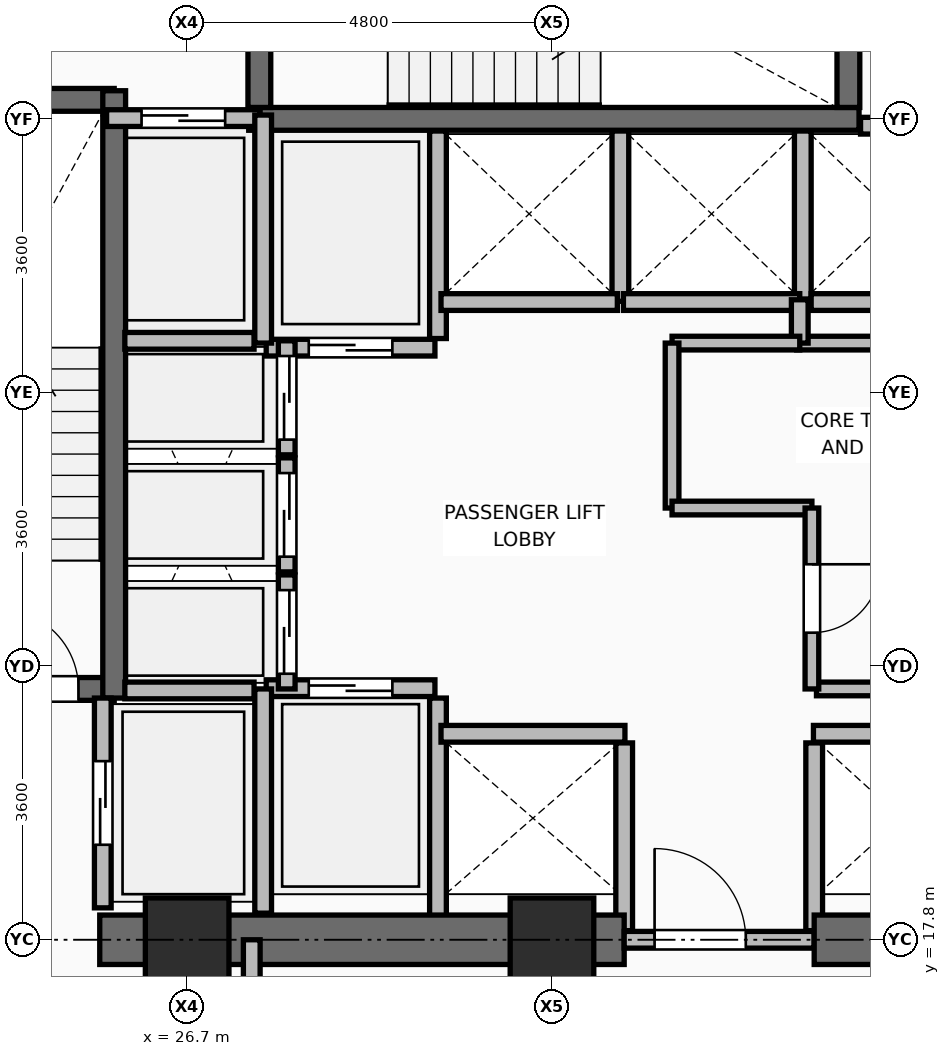
"""IFC4 building model, lengths in metres.
Left out: names, types, materials, properties, quantities, classifications, styles, units other than length and angle.
Written with IfcOpenShell. Run it as: python <this file> out.ifc"""

import sys

from ifc_helpers import new_model, si_unit, direction, frame, frame_2d, origin, origin_2d, place, context, subcontext, project, spatial, rectangle, extrude, element, fill, save


model = new_model("IFC4")
c1 = context("Model", 3, precision=1e-05, world=origin(), true_north=direction((0.0, 1.0)))
c2 = subcontext(c1, "Body", "Model", "MODEL_VIEW")
j1 = project(units=[si_unit("LENGTHUNIT", "METRE"), si_unit("PLANEANGLEUNIT", "RADIAN")], contexts=[c1])
p1 = place(None, origin())
s1 = spatial("IfcSite", under=j1, at=p1, CompositionType="ELEMENT")
p2 = place(p1, origin())
s2 = spatial("IfcBuilding", under=s1, at=p2, CompositionType="ELEMENT")
p3 = place(p2, frame((0.0, 0.0, 53.25)))
s3 = spatial("IfcBuildingStorey", under=s2, at=p3, CompositionType="ELEMENT", Elevation=53.25)
for number, where, z_axis, x_axis in (
    (1, (26.7, 17.8, 0.0), (0.0, 0.0, 1.0), (1.0, 0.0, 0.0)),
    (2, (31.5, 17.8, 0.0), (0.0, 0.0, 1.0), (1.0, 0.0, 0.0)),
):
    element("IfcColumn", number, at=place(p3, frame(where, z_axis=z_axis, x_axis=x_axis)), inside=s3, PredefinedType="COLUMN", context=c2, shape_type="SweptSolid", body=[
        extrude(rectangle(XDim=1.1, YDim=1.1, at=origin_2d()), origin(), (0.0, 0.0, 1.0), 3.75),
    ])
p4 = place(p3, frame((30.0, 18.08, 0.0), z_axis=(0.0, 0.0, 1.0), x_axis=(0.0, 1.0, 0.0)))
e3 = element("IfcWall", 3, at=p4, inside=s3, PredefinedType="PARTITIONING", context=c2, shape_type="SweptSolid", body=[
    extrude(rectangle(XDim=2.9, YDim=0.22, at=frame_2d((1.45, 0.0))), origin(), (0.0, 0.0, 1.0), 3.545),
])
for number, where, z_axis, x_axis in (
    (4, (32.45, 17.92, 0.0), (0.0, 0.0, 1.0), (0.0, 1.0, 0.0)),
    (5, (34.95, 17.92, 0.0), (0.0, 0.0, 1.0), (0.0, 1.0, 0.0)),
):
    element("IfcWall", number, at=place(p3, frame(where, z_axis=z_axis, x_axis=x_axis)), inside=s3, PredefinedType="PARTITIONING", context=c2, shape_type="SweptSolid", body=[
        extrude(rectangle(XDim=2.47, YDim=0.22, at=frame_2d((1.235, 0.0))), origin(), (0.0, 0.0, 1.0), 2.928),
    ])
p5 = place(p3, frame((30.0, 25.71, 0.0), z_axis=(0.0, 0.0, 1.0), x_axis=(0.0, 1.0, 0.0)))
e6 = element("IfcWall", 6, at=p5, inside=s3, PredefinedType="PARTITIONING", context=c2, shape_type="SweptSolid", body=[
    extrude(rectangle(XDim=2.73, YDim=0.22, at=frame_2d((1.365, 0.0))), origin(), (0.0, 0.0, 1.0), 3.545),
])
p6 = place(p3, frame((32.4, 26.2, 0.0), z_axis=(0.0, 0.0, 1.0), x_axis=(0.0, 1.0, 0.0)))
e7 = element("IfcWall", 7, at=p6, inside=s3, PredefinedType="PARTITIONING", context=c2, shape_type="SweptSolid", body=[
    extrude(rectangle(XDim=2.24, YDim=0.22, at=frame_2d((1.12, 0.0))), origin(), (0.0, 0.0, 1.0), 3.545),
])
p7 = place(p3, frame((34.8, 26.23, 0.0), z_axis=(0.0, 0.0, 1.0), x_axis=(0.0, 1.0, 0.0)))
e8 = element("IfcWall", 8, at=p7, inside=s3, PredefinedType="PARTITIONING", context=c2, shape_type="SweptSolid", body=[
    extrude(rectangle(XDim=2.21, YDim=0.22, at=frame_2d((1.105, 0.0))), origin(), (0.0, 0.0, 1.0), 3.545),
])
p8 = place(p3, frame((34.91, 26.19, 0.0), z_axis=(0.0, 0.0, 1.0), x_axis=(1.0, 0.0, 0.0)))
e9 = element("IfcWall", 9, at=p8, inside=s3, PredefinedType="PARTITIONING", context=c2, shape_type="SweptSolid", body=[
    extrude(rectangle(XDim=2.14, YDim=0.22, at=frame_2d((1.07, 0.0))), origin(), (0.0, 0.0, 1.0), 3.545),
])
p9 = place(p3, frame((25.55, 17.8, 0.0), z_axis=(0.0, 0.0, 1.0), x_axis=(1.0, 0.0, 0.0)))
e10 = element("IfcWall", 10, at=p9, inside=s3, PredefinedType="SHEAR", context=c2, shape_type="SweptSolid", body=[
    extrude(rectangle(XDim=6.9, YDim=0.65, at=frame_2d((3.45, 0.0))), origin(), (0.0, 0.0, 1.0), 3.57),
])
p10 = place(p3, frame((32.45, 17.8, 0.0), z_axis=(0.0, 0.0, 1.0), x_axis=(1.0, 0.0, 0.0)))
e11 = element("IfcWall", 11, at=p10, inside=s3, PredefinedType="PARTITIONING", context=c2, shape_type="SweptSolid", body=[
    extrude(rectangle(XDim=2.5, YDim=0.22, at=frame_2d((1.25, 0.0))), origin(), (0.0, 0.0, 1.0), 2.928),
])
p11 = place(p10, frame((0.4, 0.0, 0.0)))
e12 = element("IfcOpeningElement", 12, at=p11, cuts=e11, PredefinedType="OPENING", context=c2, shape_type="SweptSolid", body=[
    extrude(rectangle(XDim=1.2, YDim=2.1, at=frame_2d((0.6, 1.05))), frame((0.0, 0.12, 0.0), z_axis=(0.0, -1.0, 0.0), x_axis=(1.0, 0.0, 0.0)), (0.0, 0.0, 1.0), 0.24),
])
p12 = place(p3, frame((34.95, 17.8, 0.0), z_axis=(0.0, 0.0, 1.0), x_axis=(1.0, 0.0, 0.0)))
e13 = element("IfcWall", 13, at=p12, inside=s3, PredefinedType="SHEAR", context=c2, shape_type="SweptSolid", body=[
    extrude(rectangle(XDim=6.475, YDim=0.65, at=frame_2d((3.238, 0.0))), origin(), (0.0, 0.0, 1.0), 3.57),
])
p13 = place(p3, frame((22.225, 21.1, 0.0), z_axis=(0.0, 0.0, 1.0), x_axis=(1.0, 0.0, 0.0)))
e14 = element("IfcWall", 14, at=p13, inside=s3, PredefinedType="SHEAR", context=c2, shape_type="SweptSolid", body=[
    extrude(rectangle(XDim=3.515, YDim=0.3, at=frame_2d((1.757, 0.0))), origin(), (0.0, 0.0, 1.0), 3.57),
])
p14 = place(p13, frame((1.995, 0.0, 0.0)))
e15 = element("IfcOpeningElement", 15, at=p14, cuts=e14, PredefinedType="OPENING", context=c2, shape_type="SweptSolid", body=[
    extrude(rectangle(XDim=1.05, YDim=2.1, at=frame_2d((0.525, 1.05))), frame((0.0, 0.16, 0.0), z_axis=(0.0, -1.0, 0.0), x_axis=(1.0, 0.0, 0.0)), (0.0, 0.0, 1.0), 0.32),
])
p15 = place(p3, frame((22.225, 28.85, 0.0), z_axis=(0.0, 0.0, 1.0), x_axis=(1.0, 0.0, 0.0)))
e16 = element("IfcWall", 16, at=p15, inside=s3, PredefinedType="SHEAR", context=c2, shape_type="SweptSolid", body=[
    extrude(rectangle(XDim=3.515, YDim=0.3, at=frame_2d((1.757, 0.0))), origin(), (0.0, 0.0, 1.0), 3.57),
])
p16 = place(p3, frame((25.74, 20.98, 0.0), z_axis=(0.0, 0.0, 1.0), x_axis=(0.0, 1.0, 0.0)))
e17 = element("IfcWall", 17, at=p16, inside=s3, PredefinedType="SHEAR", context=c2, shape_type="SweptSolid", body=[
    extrude(rectangle(XDim=7.99, YDim=0.3, at=frame_2d((3.995, 0.0))), origin(), (0.0, 0.0, 1.0), 3.57),
])
p17 = place(p3, frame((27.51, 28.6, 0.0), z_axis=(0.0, 0.0, 1.0), x_axis=(1.0, 0.0, 0.0)))
e18 = element("IfcWall", 18, at=p17, inside=s3, PredefinedType="SHEAR", context=c2, shape_type="SweptSolid", body=[
    extrude(rectangle(XDim=8.03, YDim=0.3, at=frame_2d((4.015, 0.0))), origin(), (0.0, 0.0, 1.0), 3.57),
])
p18 = place(p3, frame((27.65, 28.75, 0.0), z_axis=(0.0, 0.0, 1.0), x_axis=(0.0, 1.0, 0.0)))
e19 = element("IfcWall", 19, at=p18, inside=s3, PredefinedType="SHEAR", context=c2, shape_type="SweptSolid", body=[
    extrude(rectangle(XDim=3.375, YDim=0.3, at=frame_2d((1.688, 0.0))), origin(), (0.0, 0.0, 1.0), 3.57),
])
p19 = place(p18, frame((1.0, 0.0, 0.0)))
e20 = element("IfcOpeningElement", 20, at=p19, cuts=e19, PredefinedType="OPENING", context=c2, shape_type="SweptSolid", body=[
    extrude(rectangle(XDim=1.05, YDim=2.1, at=frame_2d((0.525, 1.05))), frame((0.0, 0.16, 0.0), z_axis=(0.0, -1.0, 0.0), x_axis=(1.0, 0.0, 0.0)), (0.0, 0.0, 1.0), 0.32),
])
p20 = place(p3, frame((35.4, 28.75, 0.0), z_axis=(0.0, 0.0, 1.0), x_axis=(0.0, 1.0, 0.0)))
e21 = element("IfcWall", 21, at=p20, inside=s3, PredefinedType="SHEAR", context=c2, shape_type="SweptSolid", body=[
    extrude(rectangle(XDim=3.375, YDim=0.3, at=frame_2d((1.688, 0.0))), origin(), (0.0, 0.0, 1.0), 3.57),
])
p21 = place(p3, frame((25.59, 18.22, 0.0), z_axis=(0.0, 0.0, 1.0), x_axis=(0.0, 1.0, 0.0)))
e22 = element("IfcWall", 22, at=p21, inside=s3, PredefinedType="PARTITIONING", context=c2, shape_type="SweptSolid", body=[
    extrude(rectangle(XDim=2.76, YDim=0.22, at=frame_2d((1.38, 0.0))), origin(), (0.0, 0.0, 1.0), 3.55),
])
p22 = place(p21, frame((0.83, 0.0, 0.0)))
e23 = element("IfcOpeningElement", 23, at=p22, cuts=e22, PredefinedType="OPENING", context=c2, shape_type="SweptSolid", body=[
    extrude(rectangle(XDim=1.1, YDim=2.2, at=frame_2d((0.55, 1.1))), frame((0.0, 0.12, 0.0), z_axis=(0.0, -1.0, 0.0), x_axis=(1.0, 0.0, 0.0)), (0.0, 0.0, 1.0), 0.24),
])
p23 = place(p3, frame((25.64, 28.61, 0.0), z_axis=(0.0, 0.0, 1.0), x_axis=(1.0, 0.0, 0.0)))
e24 = element("IfcWall", 24, at=p23, inside=s3, PredefinedType="PARTITIONING", context=c2, shape_type="SweptSolid", body=[
    extrude(rectangle(XDim=2.02, YDim=0.22, at=frame_2d((1.01, 0.0))), origin(), (0.0, 0.0, 1.0), 3.55),
])
p24 = place(p23, frame((0.46, 0.0, 0.0)))
e25 = element("IfcOpeningElement", 25, at=p24, cuts=e24, PredefinedType="OPENING", context=c2, shape_type="SweptSolid", body=[
    extrude(rectangle(XDim=1.1, YDim=2.2, at=frame_2d((0.55, 1.1))), frame((0.0, 0.12, 0.0), z_axis=(0.0, -1.0, 0.0), x_axis=(1.0, 0.0, 0.0)), (0.0, 0.0, 1.0), 0.24),
])
p25 = place(p3, frame((27.74, 21.11, 0.0), z_axis=(0.0, 0.0, 1.0), x_axis=(1.0, 0.0, 0.0)))
e26 = element("IfcWall", 26, at=p25, inside=s3, PredefinedType="PARTITIONING", context=c2, shape_type="SweptSolid", body=[
    extrude(rectangle(XDim=2.22, YDim=0.22, at=frame_2d((1.11, 0.0))), origin(), (0.0, 0.0, 1.0), 3.55),
])
p26 = place(p25, frame((0.56, 0.0, 0.0)))
e27 = element("IfcOpeningElement", 27, at=p26, cuts=e26, PredefinedType="OPENING", context=c2, shape_type="SweptSolid", body=[
    extrude(rectangle(XDim=1.1, YDim=2.2, at=frame_2d((0.55, 1.1))), frame((0.0, 0.12, 0.0), z_axis=(0.0, -1.0, 0.0), x_axis=(1.0, 0.0, 0.0)), (0.0, 0.0, 1.0), 0.24),
])
p27 = place(p3, frame((27.74, 25.59, 0.0), z_axis=(0.0, 0.0, 1.0), x_axis=(1.0, 0.0, 0.0)))
e28 = element("IfcWall", 28, at=p27, inside=s3, PredefinedType="PARTITIONING", context=c2, shape_type="SweptSolid", body=[
    extrude(rectangle(XDim=2.22, YDim=0.22, at=frame_2d((1.11, 0.0))), origin(), (0.0, 0.0, 1.0), 3.55),
])
p28 = place(p27, frame((0.56, 0.0, 0.0)))
e29 = element("IfcOpeningElement", 29, at=p28, cuts=e28, PredefinedType="OPENING", context=c2, shape_type="SweptSolid", body=[
    extrude(rectangle(XDim=1.1, YDim=2.2, at=frame_2d((0.55, 1.1))), frame((0.0, 0.12, 0.0), z_axis=(0.0, -1.0, 0.0), x_axis=(1.0, 0.0, 0.0)), (0.0, 0.0, 1.0), 0.24),
])
p29 = place(p3, frame((30.04, 20.51, 0.0), z_axis=(0.0, 0.0, 1.0), x_axis=(1.0, 0.0, 0.0)))
e30 = element("IfcWall", 30, at=p29, inside=s3, PredefinedType="PARTITIONING", context=c2, shape_type="SweptSolid", body=[
    extrude(rectangle(XDim=2.42, YDim=0.22, at=frame_2d((1.21, 0.0))), origin(), (0.0, 0.0, 1.0), 3.55),
])
p30 = place(p3, frame((34.94, 20.51, 0.0), z_axis=(0.0, 0.0, 1.0), x_axis=(1.0, 0.0, 0.0)))
e31 = element("IfcWall", 31, at=p30, inside=s3, PredefinedType="PARTITIONING", context=c2, shape_type="SweptSolid", body=[
    extrude(rectangle(XDim=2.24, YDim=0.22, at=frame_2d((1.12, 0.0))), origin(), (0.0, 0.0, 1.0), 3.55),
])
for number, where, z_axis, x_axis in (
    (32, (30.04, 26.19, 0.0), (0.0, 0.0, 1.0), (1.0, 0.0, 0.0)),
    (33, (32.44, 26.19, 0.0), (0.0, 0.0, 1.0), (1.0, 0.0, 0.0)),
):
    element("IfcWall", number, at=place(p3, frame(where, z_axis=z_axis, x_axis=x_axis)), inside=s3, PredefinedType="PARTITIONING", context=c2, shape_type="SweptSolid", body=[
        extrude(rectangle(XDim=2.32, YDim=0.22, at=frame_2d((1.16, 0.0))), origin(), (0.0, 0.0, 1.0), 3.55),
    ])
p31 = place(p3, frame((35.56, 28.51, 0.0), z_axis=(0.0, 0.0, 1.0), x_axis=(1.0, 0.0, 0.0)))
e34 = element("IfcWall", 34, at=p31, inside=s3, PredefinedType="PARTITIONING", context=c2, shape_type="SweptSolid", body=[
    extrude(rectangle(XDim=1.6, YDim=0.22, at=frame_2d((0.8, 0.0))), origin(), (0.0, 0.0, 1.0), 3.55),
])
p32 = place(p3, frame((28.01, 21.1, 0.0), z_axis=(0.0, 0.0, 1.0), x_axis=(0.0, 1.0, 0.0)))
e35 = element("IfcWall", 35, at=p32, inside=s3, PredefinedType="PARTITIONING", context=c2, shape_type="SweptSolid", body=[
    extrude(rectangle(XDim=1.5, YDim=0.22, at=frame_2d((0.75, 0.0))), origin(), (0.0, 0.0, 1.0), 3.55),
])
p33 = place(p32, frame((0.2, 0.0, 0.0)))
e36 = element("IfcOpeningElement", 36, at=p33, cuts=e35, PredefinedType="OPENING", context=c2, shape_type="SweptSolid", body=[
    extrude(rectangle(XDim=1.1, YDim=2.2, at=frame_2d((0.55, 1.1))), frame((0.0, 0.12, 0.0), z_axis=(0.0, -1.0, 0.0), x_axis=(1.0, 0.0, 0.0)), (0.0, 0.0, 1.0), 0.24),
])
p34 = place(p3, frame((28.01, 22.64, 0.0), z_axis=(0.0, 0.0, 1.0), x_axis=(0.0, 1.0, 0.0)))
e37 = element("IfcWall", 37, at=p34, inside=s3, PredefinedType="PARTITIONING", context=c2, shape_type="SweptSolid", body=[
    extrude(rectangle(XDim=1.5, YDim=0.22, at=frame_2d((0.75, 0.0))), origin(), (0.0, 0.0, 1.0), 3.55),
])
p35 = place(p34, frame((0.2, 0.0, 0.0)))
e38 = element("IfcOpeningElement", 38, at=p35, cuts=e37, PredefinedType="OPENING", context=c2, shape_type="SweptSolid", body=[
    extrude(rectangle(XDim=1.1, YDim=2.2, at=frame_2d((0.55, 1.1))), frame((0.0, 0.12, 0.0), z_axis=(0.0, -1.0, 0.0), x_axis=(1.0, 0.0, 0.0)), (0.0, 0.0, 1.0), 0.24),
])
p36 = place(p3, frame((28.01, 24.18, 0.0), z_axis=(0.0, 0.0, 1.0), x_axis=(0.0, 1.0, 0.0)))
e39 = element("IfcWall", 39, at=p36, inside=s3, PredefinedType="PARTITIONING", context=c2, shape_type="SweptSolid", body=[
    extrude(rectangle(XDim=1.5, YDim=0.22, at=frame_2d((0.75, 0.0))), origin(), (0.0, 0.0, 1.0), 3.55),
])
p37 = place(p36, frame((0.2, 0.0, 0.0)))
e40 = element("IfcOpeningElement", 40, at=p37, cuts=e39, PredefinedType="OPENING", context=c2, shape_type="SweptSolid", body=[
    extrude(rectangle(XDim=1.1, YDim=2.2, at=frame_2d((0.55, 1.1))), frame((0.0, 0.12, 0.0), z_axis=(0.0, -1.0, 0.0), x_axis=(1.0, 0.0, 0.0)), (0.0, 0.0, 1.0), 0.24),
])
p38 = place(p3, frame((27.7, 18.15, 0.0), z_axis=(0.0, 0.0, 1.0), x_axis=(0.0, 1.0, 0.0)))
e41 = element("IfcWall", 41, at=p38, inside=s3, PredefinedType="PARTITIONING", context=c2, shape_type="SweptSolid", body=[
    extrude(rectangle(XDim=2.95, YDim=0.22, at=frame_2d((1.475, 0.0))), origin(), (0.0, 0.0, 1.0), 3.55),
])
p39 = place(p3, frame((27.7, 25.65, 0.0), z_axis=(0.0, 0.0, 1.0), x_axis=(0.0, 1.0, 0.0)))
e42 = element("IfcWall", 42, at=p39, inside=s3, PredefinedType="PARTITIONING", context=c2, shape_type="SweptSolid", body=[
    extrude(rectangle(XDim=3.0, YDim=0.22, at=frame_2d((1.5, 0.0))), origin(), (0.0, 0.0, 1.0), 3.55),
])
for number, where, z_axis, x_axis in (
    (43, (25.88, 21.08, 0.0), (0.0, 0.0, 1.0), (1.0, 0.0, 0.0)),
    (44, (25.88, 25.68, 0.0), (0.0, 0.0, 1.0), (1.0, 0.0, 0.0)),
):
    element("IfcWall", number, at=place(p3, frame(where, z_axis=z_axis, x_axis=x_axis)), inside=s3, PredefinedType="PARTITIONING", context=c2, shape_type="SweptSolid", body=[
        extrude(rectangle(XDim=1.7, YDim=0.22, at=frame_2d((0.85, 0.0))), origin(), (0.0, 0.0, 1.0), 3.55),
    ])
p40 = place(p3, frame((34.98, 21.1, 0.0), z_axis=(0.0, 0.0, 1.0), x_axis=(1.0, 0.0, 0.0)))
e45 = element("IfcWall", 45, at=p40, inside=s3, PredefinedType="PARTITIONING", context=c2, shape_type="SweptSolid", body=[
    extrude(rectangle(XDim=2.08, YDim=0.18, at=frame_2d((1.04, 0.0))), origin(), (0.0, 0.0, 1.0), 3.55),
])
p41 = place(p3, frame((34.72, 25.65, 0.0), z_axis=(0.0, 0.0, 1.0), x_axis=(1.0, 0.0, 0.0)))
e46 = element("IfcWall", 46, at=p41, inside=s3, PredefinedType="PARTITIONING", context=c2, shape_type="SweptSolid", body=[
    extrude(rectangle(XDim=2.34, YDim=0.18, at=frame_2d((1.17, 0.0))), origin(), (0.0, 0.0, 1.0), 3.55),
])
p42 = place(p3, frame((34.76, 25.65, 0.0), z_axis=(0.0, 0.0, 1.0), x_axis=(0.0, 1.0, 0.0)))
e47 = element("IfcWall", 47, at=p42, inside=s3, PredefinedType="PARTITIONING", context=c2, shape_type="SweptSolid", body=[
    extrude(rectangle(XDim=0.57, YDim=0.22, at=frame_2d((0.285, 0.0))), origin(), (0.0, 0.0, 1.0), 3.55),
])
p43 = place(p3, frame((33.08, 25.65, 0.0), z_axis=(0.0, 0.0, 1.0), x_axis=(1.0, 0.0, 0.0)))
e48 = element("IfcWall", 48, at=p43, inside=s3, PredefinedType="PARTITIONING", context=c2, shape_type="SweptSolid", body=[
    extrude(rectangle(XDim=1.68, YDim=0.18, at=frame_2d((0.84, 0.0))), origin(), (0.0, 0.0, 1.0), 3.55),
])
p44 = place(p3, frame((33.08, 23.48, 0.0), z_axis=(0.0, 0.0, 1.0), x_axis=(0.0, 1.0, 0.0)))
e49 = element("IfcWall", 49, at=p44, inside=s3, PredefinedType="PARTITIONING", context=c2, shape_type="SweptSolid", body=[
    extrude(rectangle(XDim=2.17, YDim=0.18, at=frame_2d((1.085, 0.0))), origin(), (0.0, 0.0, 1.0), 3.55),
])
p45 = place(p3, frame((33.08, 23.48, 0.0), z_axis=(0.0, 0.0, 1.0), x_axis=(1.0, 0.0, 0.0)))
e50 = element("IfcWall", 50, at=p45, inside=s3, PredefinedType="PARTITIONING", context=c2, shape_type="SweptSolid", body=[
    extrude(rectangle(XDim=1.84, YDim=0.18, at=frame_2d((0.92, 0.0))), origin(), (0.0, 0.0, 1.0), 3.55),
])
p46 = place(p3, frame((34.92, 21.1, 0.0), z_axis=(0.0, 0.0, 1.0), x_axis=(0.0, 1.0, 0.0)))
e51 = element("IfcWall", 51, at=p46, inside=s3, PredefinedType="PARTITIONING", context=c2, shape_type="SweptSolid", body=[
    extrude(rectangle(XDim=2.38, YDim=0.18, at=frame_2d((1.19, 0.0))), origin(), (0.0, 0.0, 1.0), 3.55),
])
p47 = place(p46, frame((0.74, 0.0, 0.0)))
e52 = element("IfcOpeningElement", 52, at=p47, cuts=e51, PredefinedType="OPENING", context=c2, shape_type="SweptSolid", body=[
    extrude(rectangle(XDim=0.9, YDim=2.1, at=frame_2d((0.45, 1.05))), frame((0.0, 0.1, 0.0), z_axis=(0.0, -1.0, 0.0), x_axis=(1.0, 0.0, 0.0)), (0.0, 0.0, 1.0), 0.2),
])
p48 = place(p3, frame((27.55, 14.35, 0.0), z_axis=(0.0, 0.0, 1.0), x_axis=(0.0, 1.0, 0.0)))
e53 = element("IfcWall", 53, at=p48, inside=s3, PredefinedType="PARTITIONING", context=c2, shape_type="SweptSolid", body=[
    extrude(rectangle(XDim=3.45, YDim=0.22, at=frame_2d((1.725, 0.0))), origin(), (0.0, 0.0, 1.0), 2.928),
])
p49 = place(p48, frame((1.175, 0.0, 0.0)))
e54 = element("IfcOpeningElement", 54, at=p49, cuts=e53, PredefinedType="OPENING", context=c2, shape_type="SweptSolid", body=[
    extrude(rectangle(XDim=1.1, YDim=2.1, at=frame_2d((0.55, 1.05))), frame((0.0, 0.12, 0.0), z_axis=(0.0, -1.0, 0.0), x_axis=(1.0, 0.0, 0.0)), (0.0, 0.0, 1.0), 0.24),
])
p50 = place(p11, origin())
e55 = element("IfcDoor", 55, at=p50, inside=s3, OperationType="SINGLE_SWING_LEFT", PredefinedType="DOOR", context=c2, shape_type="SweptSolid", body=[
    extrude(rectangle(XDim=1.2, YDim=2.1, at=frame_2d((0.6, 1.05))), frame((0.0, 0.025, 0.0), z_axis=(0.0, -1.0, 0.0), x_axis=(1.0, 0.0, 0.0)), (0.0, 0.0, 1.0), 0.05),
])
fill(e12, e55)
p51 = place(p14, origin())
e56 = element("IfcDoor", 56, at=p51, inside=s3, OperationType="SINGLE_SWING_LEFT", PredefinedType="DOOR", context=c2, shape_type="SweptSolid", body=[
    extrude(rectangle(XDim=1.05, YDim=2.1, at=frame_2d((0.525, 1.05))), frame((0.0, 0.025, 0.0), z_axis=(0.0, -1.0, 0.0), x_axis=(1.0, 0.0, 0.0)), (0.0, 0.0, 1.0), 0.05),
])
fill(e15, e56)
p52 = place(p22, origin())
e57 = element("IfcDoor", 57, at=p52, inside=s3, OperationType="DOUBLE_DOOR_SLIDING", PredefinedType="DOOR", context=c2, shape_type="SweptSolid", body=[
    extrude(rectangle(XDim=1.1, YDim=2.2, at=frame_2d((0.55, 1.1))), frame((0.0, 0.025, 0.0), z_axis=(0.0, -1.0, 0.0), x_axis=(1.0, 0.0, 0.0)), (0.0, 0.0, 1.0), 0.05),
])
fill(e23, e57)
p53 = place(p24, origin())
e58 = element("IfcDoor", 58, at=p53, inside=s3, OperationType="DOUBLE_DOOR_SLIDING", PredefinedType="DOOR", context=c2, shape_type="SweptSolid", body=[
    extrude(rectangle(XDim=1.1, YDim=2.2, at=frame_2d((0.55, 1.1))), frame((0.0, 0.025, 0.0), z_axis=(0.0, -1.0, 0.0), x_axis=(1.0, 0.0, 0.0)), (0.0, 0.0, 1.0), 0.05),
])
fill(e25, e58)
p54 = place(p26, origin())
e59 = element("IfcDoor", 59, at=p54, inside=s3, OperationType="DOUBLE_DOOR_SLIDING", PredefinedType="DOOR", context=c2, shape_type="SweptSolid", body=[
    extrude(rectangle(XDim=1.1, YDim=2.2, at=frame_2d((0.55, 1.1))), frame((0.0, 0.025, 0.0), z_axis=(0.0, -1.0, 0.0), x_axis=(1.0, 0.0, 0.0)), (0.0, 0.0, 1.0), 0.05),
])
fill(e27, e59)
p55 = place(p28, frame((1.1, 0.0, 0.0), z_axis=(0.0, 0.0, 1.0), x_axis=(-1.0, 0.0, 0.0)))
e60 = element("IfcDoor", 60, at=p55, inside=s3, OperationType="DOUBLE_DOOR_SLIDING", PredefinedType="DOOR", context=c2, shape_type="SweptSolid", body=[
    extrude(rectangle(XDim=1.1, YDim=2.2, at=frame_2d((0.55, 1.1))), frame((0.0, 0.025, 0.0), z_axis=(0.0, -1.0, 0.0), x_axis=(1.0, 0.0, 0.0)), (0.0, 0.0, 1.0), 0.05),
])
fill(e29, e60)
p56 = place(p33, frame((1.1, 0.0, 0.0), z_axis=(0.0, 0.0, 1.0), x_axis=(-1.0, 0.0, 0.0)))
e61 = element("IfcDoor", 61, at=p56, inside=s3, OperationType="DOUBLE_DOOR_SLIDING", PredefinedType="DOOR", context=c2, shape_type="SweptSolid", body=[
    extrude(rectangle(XDim=1.1, YDim=2.2, at=frame_2d((0.55, 1.1))), frame((0.0, 0.025, 0.0), z_axis=(0.0, -1.0, 0.0), x_axis=(1.0, 0.0, 0.0)), (0.0, 0.0, 1.0), 0.05),
])
fill(e36, e61)
p57 = place(p35, frame((1.1, 0.0, 0.0), z_axis=(0.0, 0.0, 1.0), x_axis=(-1.0, 0.0, 0.0)))
e62 = element("IfcDoor", 62, at=p57, inside=s3, OperationType="DOUBLE_DOOR_SLIDING", PredefinedType="DOOR", context=c2, shape_type="SweptSolid", body=[
    extrude(rectangle(XDim=1.1, YDim=2.2, at=frame_2d((0.55, 1.1))), frame((0.0, 0.025, 0.0), z_axis=(0.0, -1.0, 0.0), x_axis=(1.0, 0.0, 0.0)), (0.0, 0.0, 1.0), 0.05),
])
fill(e38, e62)
p58 = place(p37, frame((1.1, 0.0, 0.0), z_axis=(0.0, 0.0, 1.0), x_axis=(-1.0, 0.0, 0.0)))
e63 = element("IfcDoor", 63, at=p58, inside=s3, OperationType="DOUBLE_DOOR_SLIDING", PredefinedType="DOOR", context=c2, shape_type="SweptSolid", body=[
    extrude(rectangle(XDim=1.1, YDim=2.2, at=frame_2d((0.55, 1.1))), frame((0.0, 0.025, 0.0), z_axis=(0.0, -1.0, 0.0), x_axis=(1.0, 0.0, 0.0)), (0.0, 0.0, 1.0), 0.05),
])
fill(e40, e63)
p59 = place(p47, frame((0.9, 0.0, 0.0), z_axis=(0.0, 0.0, 1.0), x_axis=(-1.0, 0.0, 0.0)))
e64 = element("IfcDoor", 64, at=p59, inside=s3, OperationType="SINGLE_SWING_LEFT", PredefinedType="DOOR", context=c2, shape_type="SweptSolid", body=[
    extrude(rectangle(XDim=0.9, YDim=2.1, at=frame_2d((0.45, 1.05))), frame((0.0, 0.025, 0.0), z_axis=(0.0, -1.0, 0.0), x_axis=(1.0, 0.0, 0.0)), (0.0, 0.0, 1.0), 0.05),
])
fill(e52, e64)
save(model, sys.argv[1])
